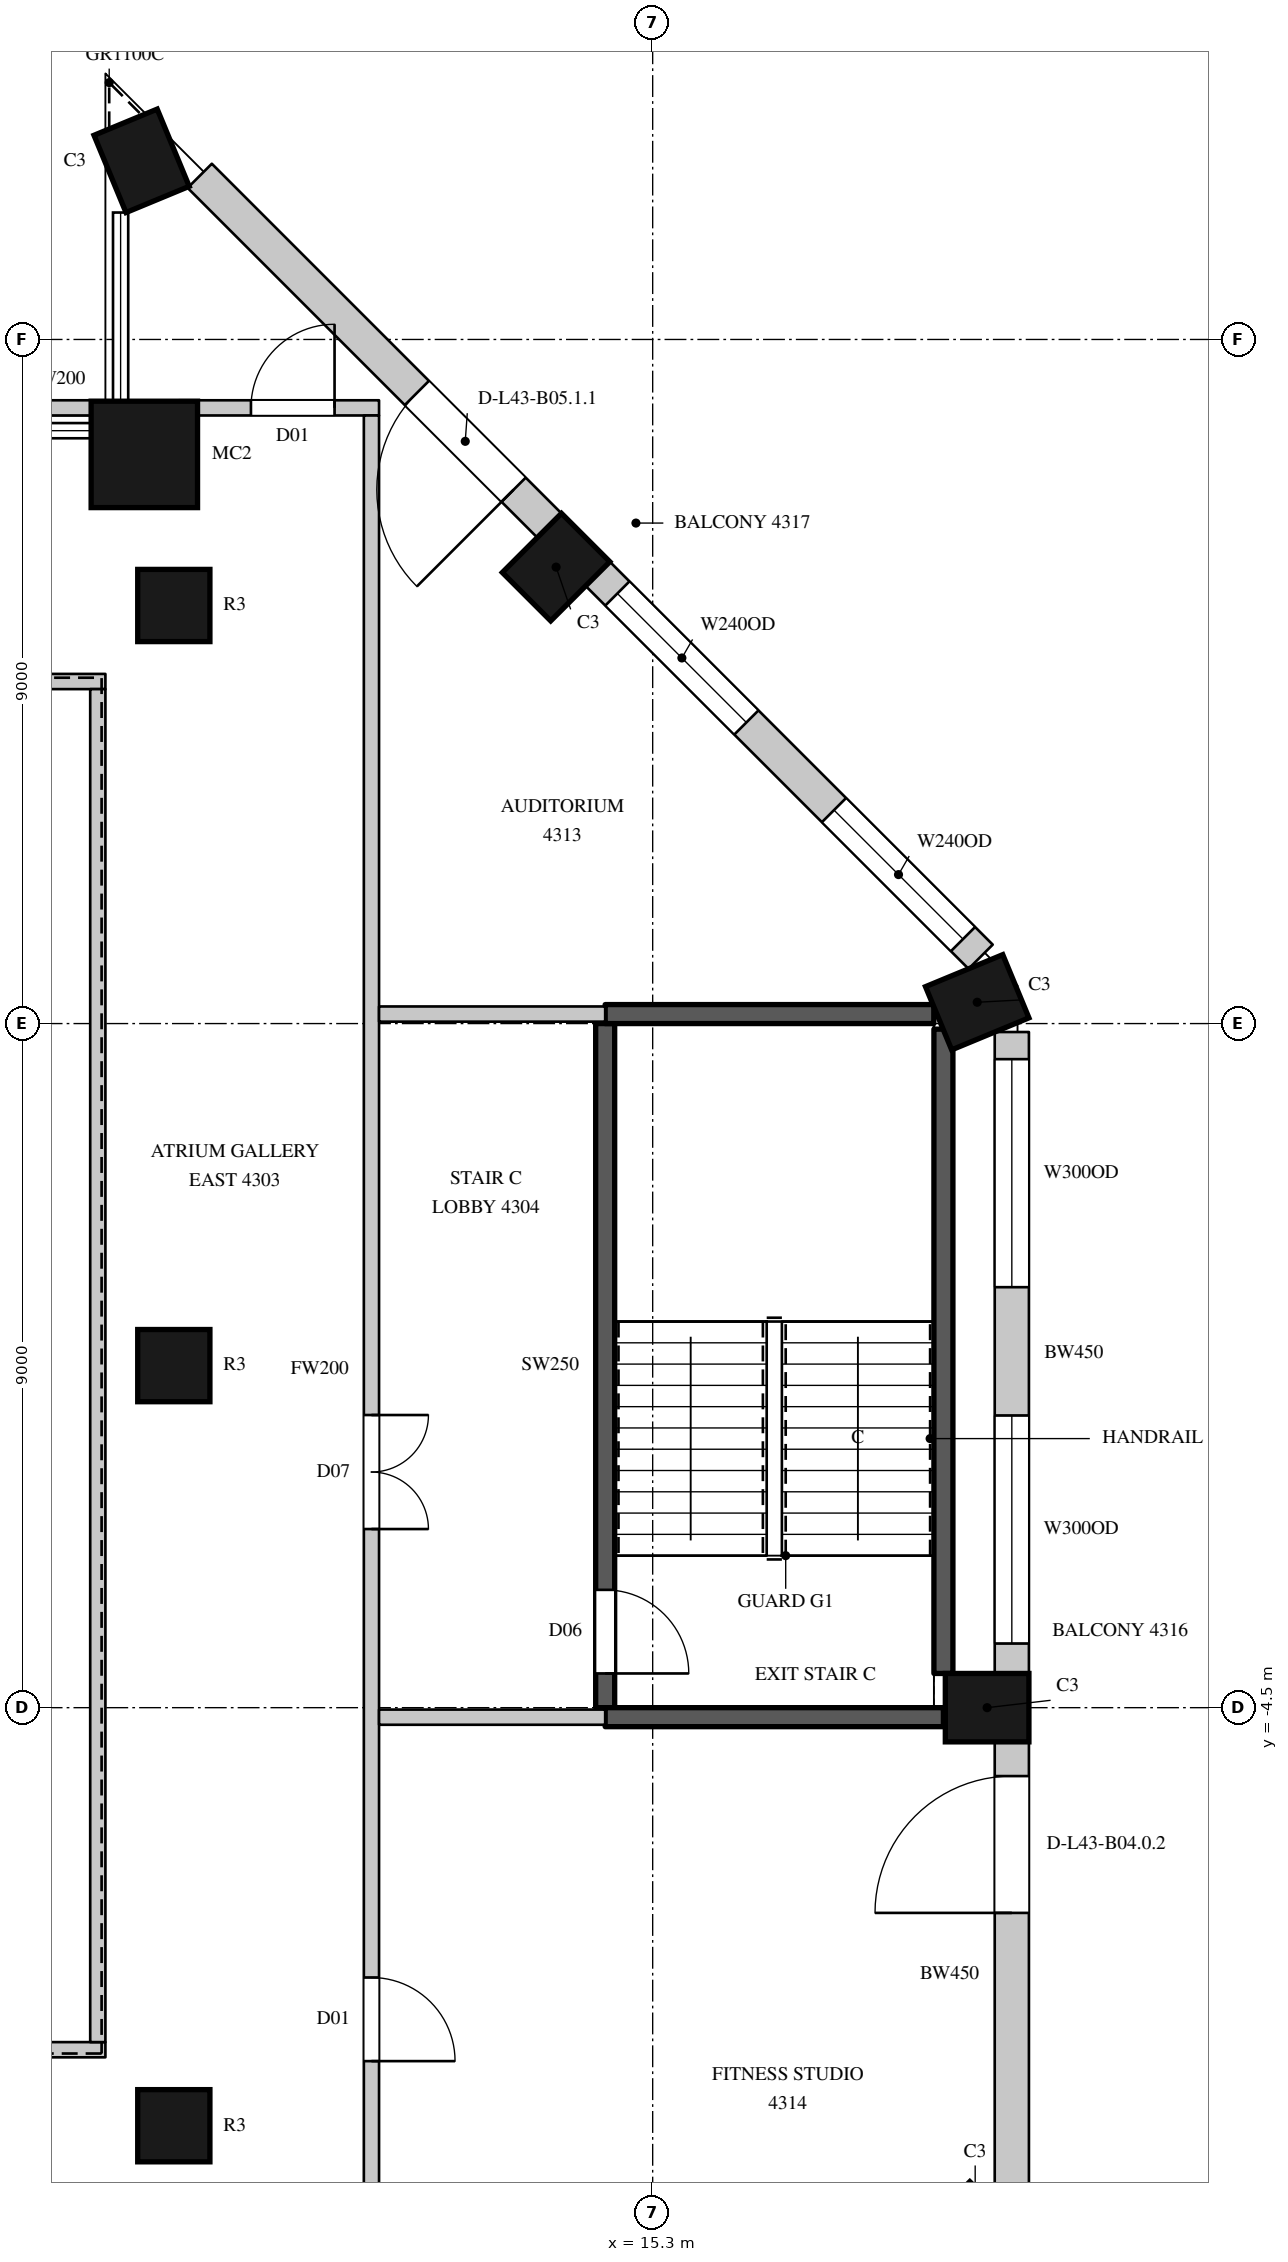
"""IFC4 building model, lengths in metres.
Left out: names, types, materials, properties, quantities, classifications, styles, units other than length and angle.
Written with IfcOpenShell. Run it as: python <this file> out.ifc"""

import sys

from ifc_helpers import new_model, si_unit, direction, frame, frame_2d, origin, origin_2d, place, context, subcontext, project, spatial, rectangle, circle, extrude, element, fill, save


model = new_model("IFC4")
c1 = context("Model", 3, precision=1e-05, world=origin(), true_north=direction((0.0, 1.0)))
c2 = subcontext(c1, "Body", "Model", "MODEL_VIEW")
j1 = project(units=[si_unit("LENGTHUNIT", "METRE"), si_unit("PLANEANGLEUNIT", "RADIAN")], contexts=[c1])
p1 = place(None, origin())
s1 = spatial("IfcSite", under=j1, at=p1, CompositionType="ELEMENT")
p2 = place(p1, origin())
s2 = spatial("IfcBuilding", under=s1, at=p2, CompositionType="ELEMENT")
p3 = place(p2, frame((0.0, 0.0, 197.4)))
s3 = spatial("IfcBuildingStorey", under=s2, at=p3, CompositionType="ELEMENT", Elevation=197.4)
for number, where, z_axis, x_axis in (
    (1, (19.543, -11.443, 0.0), (0.0, 0.0, 1.0), (0.707, 0.707, 0.0)),
    (2, (19.7, -4.5, 0.0), (0.0, 0.0, 1.0), (0.0, 1.0, 0.0)),
    (3, (19.57, 4.78, 0.0), (0.0, 0.0, 1.0), (-0.383, 0.924, 0.0)),
    (4, (14.029, 10.505, 0.0), (0.0, 0.0, 1.0), (-0.707, 0.707, 0.0)),
    (5, (8.576, 15.85, 0.0), (0.0, 0.0, 1.0), (-0.924, -0.383, 0.0)),
):
    element("IfcColumn", number, at=place(p3, frame(where, z_axis=z_axis, x_axis=x_axis)), inside=s3, PredefinedType="COLUMN", context=c2, shape_type="SweptSolid", body=[
        extrude(rectangle(XDim=0.9, YDim=1.1, at=origin_2d()), origin(), (0.0, 0.0, 1.0), 4.1),
    ])
p4 = place(p3, frame((8.612, 11.988, 0.0), z_axis=(0.0, 0.0, 1.0), x_axis=(1.0, 0.0, 0.0)))
e6 = element("IfcColumn", 6, at=p4, inside=s3, PredefinedType="COLUMN", context=c2, shape_type="SweptSolid", body=[
    extrude(circle(Radius=0.7, at=origin_2d()), origin(), (0.0, 0.0, 1.0), 4.1),
])
for number, where, z_axis, x_axis in (
    (7, (9.0, -10.0, 0.0), (0.0, 0.0, 1.0), (1.0, 0.0, 0.0)),
    (8, (9.0, 0.0, 0.0), (0.0, 0.0, 1.0), (1.0, 0.0, 0.0)),
    (9, (9.0, 10.0, 0.0), (0.0, 0.0, 1.0), (1.0, 0.0, 0.0)),
):
    element("IfcColumn", number, at=place(p3, frame(where, z_axis=z_axis, x_axis=x_axis)), inside=s3, PredefinedType="COLUMN", context=c2, shape_type="SweptSolid", body=[
        extrude(circle(Radius=0.475, at=origin_2d()), origin(), (0.0, 0.0, 1.0), 4.1),
    ])
p5 = place(p3, frame((20.025, -11.064, 0.0), z_axis=(0.0, 0.0, 1.0), x_axis=(0.0, 1.0, 0.0)))
e10 = element("IfcWall", 10, at=p5, inside=s3, PredefinedType="SOLIDWALL", context=c2, shape_type="SweptSolid", body=[
    extrude(rectangle(XDim=6.114, YDim=0.45, at=frame_2d((3.057, 0.0))), origin(), (0.0, 0.0, 1.0), 3.8),
])
p6 = place(p5, frame((3.864, 0.0, 0.0)))
e11 = element("IfcOpeningElement", 11, at=p6, cuts=e10, PredefinedType="OPENING", context=c2, shape_type="SweptSolid", body=[
    extrude(rectangle(XDim=1.8, YDim=2.4, at=frame_2d((0.9, 1.2))), frame((0.0, 0.235, 0.0), z_axis=(0.0, -1.0, 0.0), x_axis=(1.0, 0.0, 0.0)), (0.0, 0.0, 1.0), 0.47),
])
p7 = place(p3, frame((20.025, -4.05, 0.0), z_axis=(0.0, 0.0, 1.0), x_axis=(0.0, 1.0, 0.0)))
e12 = element("IfcWall", 12, at=p7, inside=s3, PredefinedType="SOLIDWALL", context=c2, shape_type="SweptSolid", body=[
    extrude(rectangle(XDim=8.439, YDim=0.45, at=frame_2d((4.219, 0.0))), origin(), (0.0, 0.0, 1.0), 3.8),
])
p8 = place(p7, frame((0.394, 0.0, 1.05)))
e13 = element("IfcOpeningElement", 13, at=p8, cuts=e12, PredefinedType="OPENING", context=c2, shape_type="SweptSolid", body=[
    extrude(rectangle(XDim=3.0, YDim=2.4, at=frame_2d((1.5, 1.2))), frame((0.0, 0.235, 0.0), z_axis=(0.0, -1.0, 0.0), x_axis=(1.0, 0.0, 0.0)), (0.0, 0.0, 1.0), 0.47),
])
p9 = place(p7, frame((5.082, 0.0, 1.05)))
e14 = element("IfcOpeningElement", 14, at=p9, cuts=e12, PredefinedType="OPENING", context=c2, shape_type="SweptSolid", body=[
    extrude(rectangle(XDim=3.0, YDim=2.4, at=frame_2d((1.5, 1.2))), frame((0.0, 0.235, 0.0), z_axis=(0.0, -1.0, 0.0), x_axis=(1.0, 0.0, 0.0)), (0.0, 0.0, 1.0), 0.47),
])
p10 = place(p3, frame((19.615, 5.379, 0.0), z_axis=(0.0, 0.0, 1.0), x_axis=(-0.707089646058, 0.7071239159, 0.0)))
e15 = element("IfcWall", 15, at=p10, inside=s3, PredefinedType="SOLIDWALL", context=c2, shape_type="SweptSolid", body=[
    extrude(rectangle(XDim=7.124, YDim=0.45, at=frame_2d((3.562, 0.0))), origin(), (0.0, 0.0, 1.0), 3.8),
])
p11 = place(p10, frame((0.328, 0.0, 1.05)))
e16 = element("IfcOpeningElement", 16, at=p11, cuts=e15, PredefinedType="OPENING", context=c2, shape_type="SweptSolid", body=[
    extrude(rectangle(XDim=2.4, YDim=2.4, at=frame_2d((1.2, 1.2))), frame((0.0, 0.235, 0.0), z_axis=(0.0, -1.0, 0.0), x_axis=(1.0, 0.0, 0.0)), (0.0, 0.0, 1.0), 0.47),
])
p12 = place(p10, frame((4.359, 0.0, 1.05)))
e17 = element("IfcOpeningElement", 17, at=p12, cuts=e15, PredefinedType="OPENING", context=c2, shape_type="SweptSolid", body=[
    extrude(rectangle(XDim=2.4, YDim=2.4, at=frame_2d((1.2, 1.2))), frame((0.0, 0.235, 0.0), z_axis=(0.0, -1.0, 0.0), x_axis=(1.0, 0.0, 0.0)), (0.0, 0.0, 1.0), 0.47),
])
p13 = place(p3, frame((13.941, 11.053, 0.0), z_axis=(0.0, 0.0, 1.0), x_axis=(-0.707106781187, 0.707106781187, 0.0)))
e18 = element("IfcWall", 18, at=p13, inside=s3, PredefinedType="SOLIDWALL", context=c2, shape_type="SweptSolid", body=[
    extrude(rectangle(XDim=6.505, YDim=0.45, at=frame_2d((3.252, 0.0))), origin(), (0.0, 0.0, 1.0), 3.8),
])
p14 = place(p13, frame((0.665, 0.0, 0.0)))
e19 = element("IfcOpeningElement", 19, at=p14, cuts=e18, PredefinedType="OPENING", context=c2, shape_type="SweptSolid", body=[
    extrude(rectangle(XDim=1.8, YDim=2.4, at=frame_2d((0.9, 1.2))), frame((0.0, 0.235, 0.0), z_axis=(0.0, -1.0, 0.0), x_axis=(1.0, 0.0, 0.0)), (0.0, 0.0, 1.0), 0.47),
])
for number, where, z_axis, x_axis in (
    (20, (4.52, -9.0, 0.0), (0.0, 0.0, 1.0), (1.0, 0.0, 0.0)),
    (21, (4.52, 9.0, 0.0), (0.0, 0.0, 1.0), (1.0, 0.0, 0.0)),
):
    element("IfcWall", number, at=place(p3, frame(where, z_axis=z_axis, x_axis=x_axis)), inside=s3, PredefinedType="PARTITIONING", context=c2, shape_type="SweptSolid", body=[
        extrude(rectangle(XDim=3.58, YDim=0.2, at=frame_2d((1.79, 0.0))), origin(), (0.0, 0.0, 1.0), 3.8),
    ])
p15 = place(p3, frame((6.75, 12.6, 0.0), z_axis=(0.0, 0.0, 1.0), x_axis=(1.0, 0.0, 0.0)))
e22 = element("IfcWall", 22, at=p15, inside=s3, PredefinedType="PARTITIONING", context=c2, shape_type="SweptSolid", body=[
    extrude(rectangle(XDim=1.41, YDim=0.2, at=frame_2d((0.705, 0.0))), origin(), (0.0, 0.0, 1.0), 3.8),
])
p16 = place(p3, frame((8.0, -8.9, 0.0), z_axis=(0.0, 0.0, 1.0), x_axis=(0.0, 1.0, 0.0)))
e23 = element("IfcWall", 23, at=p16, inside=s3, PredefinedType="PARTITIONING", context=c2, shape_type="SweptSolid", body=[
    extrude(rectangle(XDim=17.8, YDim=0.2, at=frame_2d((8.9, 0.0))), origin(), (0.0, 0.0, 1.0), 3.8),
])
p17 = place(p3, frame((9.065, 12.6, 0.0), z_axis=(0.0, 0.0, 1.0), x_axis=(1.0, 0.0, 0.0)))
e24 = element("IfcWall", 24, at=p17, inside=s3, PredefinedType="PARTITIONING", context=c2, shape_type="SweptSolid", body=[
    extrude(rectangle(XDim=2.635, YDim=0.2, at=frame_2d((1.318, 0.0))), origin(), (0.0, 0.0, 1.0), 3.8),
])
p18 = place(p17, frame((0.95, 0.0, 0.0)))
e25 = element("IfcOpeningElement", 25, at=p18, cuts=e24, PredefinedType="OPENING", context=c2, shape_type="SweptSolid", body=[
    extrude(rectangle(XDim=1.1, YDim=2.4, at=frame_2d((0.55, 1.2))), frame((0.0, 0.11, 0.0), z_axis=(0.0, -1.0, 0.0), x_axis=(1.0, 0.0, 0.0)), (0.0, 0.0, 1.0), 0.22),
])
p19 = place(p3, frame((11.6, -12.6, 0.0), z_axis=(0.0, 0.0, 1.0), x_axis=(0.0, 1.0, 0.0)))
e26 = element("IfcWall", 26, at=p19, inside=s3, PredefinedType="PARTITIONING", context=c2, shape_type="SweptSolid", body=[
    extrude(rectangle(XDim=25.1, YDim=0.2, at=frame_2d((12.55, 0.0))), origin(), (0.0, 0.0, 1.0), 3.8),
])
p20 = place(p19, frame((10.45, 0.0, 0.0)))
e27 = element("IfcOpeningElement", 27, at=p20, cuts=e26, PredefinedType="OPENING", context=c2, shape_type="SweptSolid", body=[
    extrude(rectangle(XDim=1.5, YDim=2.4, at=frame_2d((0.75, 1.2))), frame((0.0, 0.11, 0.0), z_axis=(0.0, -1.0, 0.0), x_axis=(1.0, 0.0, 0.0)), (0.0, 0.0, 1.0), 0.22),
])
p21 = place(p19, frame((3.45, 0.0, 0.0)))
e28 = element("IfcOpeningElement", 28, at=p21, cuts=e26, PredefinedType="OPENING", context=c2, shape_type="SweptSolid", body=[
    extrude(rectangle(XDim=1.1, YDim=2.4, at=frame_2d((0.55, 1.2))), frame((0.0, 0.11, 0.0), z_axis=(0.0, -1.0, 0.0), x_axis=(1.0, 0.0, 0.0)), (0.0, 0.0, 1.0), 0.22),
])
for number, where, z_axis, x_axis in (
    (29, (11.7, -4.625, 0.0), (0.0, 0.0, 1.0), (1.0, 0.0, 0.0)),
    (30, (11.7, 4.625, 0.0), (0.0, 0.0, 1.0), (1.0, 0.0, 0.0)),
):
    element("IfcWall", number, at=place(p3, frame(where, z_axis=z_axis, x_axis=x_axis)), inside=s3, PredefinedType="PARTITIONING", context=c2, shape_type="SweptSolid", body=[
        extrude(rectangle(XDim=2.975, YDim=0.2, at=frame_2d((1.488, 0.0))), origin(), (0.0, 0.0, 1.0), 3.8),
    ])
p22 = place(p3, frame((14.675, -4.5, 0.0), z_axis=(0.0, 0.0, 1.0), x_axis=(0.0, 1.0, 0.0)))
e31 = element("IfcWall", 31, at=p22, inside=s3, PredefinedType="SHEAR", context=c2, shape_type="SweptSolid", body=[
    extrude(rectangle(XDim=9.0, YDim=0.25, at=frame_2d((4.5, 0.0))), origin(), (0.0, 0.0, 1.0), 3.8),
])
p23 = place(p22, frame((0.45, 0.0, 0.0)))
e32 = element("IfcOpeningElement", 32, at=p23, cuts=e31, PredefinedType="OPENING", context=c2, shape_type="SweptSolid", body=[
    extrude(rectangle(XDim=1.1, YDim=2.2, at=frame_2d((0.55, 1.1))), frame((0.0, 0.135, 0.0), z_axis=(0.0, -1.0, 0.0), x_axis=(1.0, 0.0, 0.0)), (0.0, 0.0, 1.0), 0.27),
])
p24 = place(p3, frame((14.675, -4.625, 0.0), z_axis=(0.0, 0.0, 1.0), x_axis=(1.0, 0.0, 0.0)))
e33 = element("IfcWall", 33, at=p24, inside=s3, PredefinedType="SHEAR", context=c2, shape_type="SweptSolid", body=[
    extrude(rectangle(XDim=4.45, YDim=0.25, at=frame_2d((2.225, 0.0))), origin(), (0.0, 0.0, 1.0), 3.8),
])
p25 = place(p3, frame((14.675, 4.625, 0.0), z_axis=(0.0, 0.0, 1.0), x_axis=(1.0, 0.0, 0.0)))
e34 = element("IfcWall", 34, at=p25, inside=s3, PredefinedType="SHEAR", context=c2, shape_type="SweptSolid", body=[
    extrude(rectangle(XDim=4.324, YDim=0.25, at=frame_2d((2.162, 0.0))), origin(), (0.0, 0.0, 1.0), 3.8),
])
p26 = place(p3, frame((19.125, -4.05, 0.0), z_axis=(0.0, 0.0, 1.0), x_axis=(0.0, 1.0, 0.0)))
e35 = element("IfcWall", 35, at=p26, inside=s3, PredefinedType="SHEAR", context=c2, shape_type="SweptSolid", body=[
    extrude(rectangle(XDim=8.477, YDim=0.25, at=frame_2d((4.238, 0.0))), origin(), (0.0, 0.0, 1.0), 3.8),
])
p27 = place(p6, origin())
e36 = element("IfcDoor", 36, at=p27, inside=s3, OperationType="SLIDING_TO_LEFT", PredefinedType="DOOR", context=c2, shape_type="SweptSolid", body=[
    extrude(rectangle(XDim=1.8, YDim=2.4, at=frame_2d((0.9, 1.2))), frame((0.0, 0.13, 0.0), z_axis=(0.0, -1.0, 0.0), x_axis=(1.0, 0.0, 0.0)), (0.0, 0.0, 1.0), 0.05),
])
fill(e11, e36)
p28 = place(p8, origin())
e37 = element("IfcWindow", 37, at=p28, inside=s3, PartitioningType="SINGLE_PANEL", PredefinedType="WINDOW", context=c2, shape_type="SweptSolid", body=[
    extrude(rectangle(XDim=3.0, YDim=2.4, at=frame_2d((1.5, 1.2))), frame((0.0, 0.135, 0.0), z_axis=(0.0, -1.0, 0.0), x_axis=(1.0, 0.0, 0.0)), (0.0, 0.0, 1.0), 0.06),
])
fill(e13, e37)
p29 = place(p9, origin())
e38 = element("IfcWindow", 38, at=p29, inside=s3, PartitioningType="SINGLE_PANEL", PredefinedType="WINDOW", context=c2, shape_type="SweptSolid", body=[
    extrude(rectangle(XDim=3.0, YDim=2.4, at=frame_2d((1.5, 1.2))), frame((0.0, 0.135, 0.0), z_axis=(0.0, -1.0, 0.0), x_axis=(1.0, 0.0, 0.0)), (0.0, 0.0, 1.0), 0.06),
])
fill(e14, e38)
p30 = place(p11, origin())
e39 = element("IfcWindow", 39, at=p30, inside=s3, PartitioningType="SINGLE_PANEL", PredefinedType="WINDOW", context=c2, shape_type="SweptSolid", body=[
    extrude(rectangle(XDim=2.4, YDim=2.4, at=frame_2d((1.2, 1.2))), frame((0.0, 0.135, 0.0), z_axis=(0.0, -1.0, 0.0), x_axis=(1.0, 0.0, 0.0)), (0.0, 0.0, 1.0), 0.06),
])
fill(e16, e39)
p31 = place(p12, origin())
e40 = element("IfcWindow", 40, at=p31, inside=s3, PartitioningType="SINGLE_PANEL", PredefinedType="WINDOW", context=c2, shape_type="SweptSolid", body=[
    extrude(rectangle(XDim=2.4, YDim=2.4, at=frame_2d((1.2, 1.2))), frame((0.0, 0.135, 0.0), z_axis=(0.0, -1.0, 0.0), x_axis=(1.0, 0.0, 0.0)), (0.0, 0.0, 1.0), 0.06),
])
fill(e17, e40)
p32 = place(p14, origin())
e41 = element("IfcDoor", 41, at=p32, inside=s3, OperationType="SLIDING_TO_LEFT", PredefinedType="DOOR", context=c2, shape_type="SweptSolid", body=[
    extrude(rectangle(XDim=1.8, YDim=2.4, at=frame_2d((0.9, 1.2))), frame((0.0, 0.13, 0.0), z_axis=(0.0, -1.0, 0.0), x_axis=(1.0, 0.0, 0.0)), (0.0, 0.0, 1.0), 0.05),
])
fill(e19, e41)
p33 = place(p20, origin())
e42 = element("IfcDoor", 42, at=p33, inside=s3, OperationType="DOUBLE_DOOR_SINGLE_SWING", PredefinedType="DOOR", context=c2, shape_type="SweptSolid", body=[
    extrude(rectangle(XDim=1.5, YDim=2.4, at=frame_2d((0.75, 1.2))), frame((0.0, 0.025, 0.0), z_axis=(0.0, -1.0, 0.0), x_axis=(1.0, 0.0, 0.0)), (0.0, 0.0, 1.0), 0.05),
])
fill(e27, e42)
p34 = place(p18, origin())
e43 = element("IfcDoor", 43, at=p34, inside=s3, OperationType="SINGLE_SWING_RIGHT", PredefinedType="DOOR", context=c2, shape_type="SweptSolid", body=[
    extrude(rectangle(XDim=1.1, YDim=2.4, at=frame_2d((0.55, 1.2))), frame((0.0, 0.025, 0.0), z_axis=(0.0, -1.0, 0.0), x_axis=(1.0, 0.0, 0.0)), (0.0, 0.0, 1.0), 0.05),
])
fill(e25, e43)
p35 = place(p21, origin())
e44 = element("IfcDoor", 44, at=p35, inside=s3, OperationType="SINGLE_SWING_RIGHT", PredefinedType="DOOR", context=c2, shape_type="SweptSolid", body=[
    extrude(rectangle(XDim=1.1, YDim=2.4, at=frame_2d((0.55, 1.2))), frame((0.0, 0.025, 0.0), z_axis=(0.0, -1.0, 0.0), x_axis=(1.0, 0.0, 0.0)), (0.0, 0.0, 1.0), 0.05),
])
fill(e28, e44)
p36 = place(p23, origin())
e45 = element("IfcDoor", 45, at=p36, inside=s3, OperationType="SINGLE_SWING_RIGHT", PredefinedType="DOOR", context=c2, shape_type="SweptSolid", body=[
    extrude(rectangle(XDim=1.1, YDim=2.2, at=frame_2d((0.55, 1.1))), frame((0.0, 0.025, 0.0), z_axis=(0.0, -1.0, 0.0), x_axis=(1.0, 0.0, 0.0)), (0.0, 0.0, 1.0), 0.05),
])
fill(e32, e45)
save(model, sys.argv[1])
